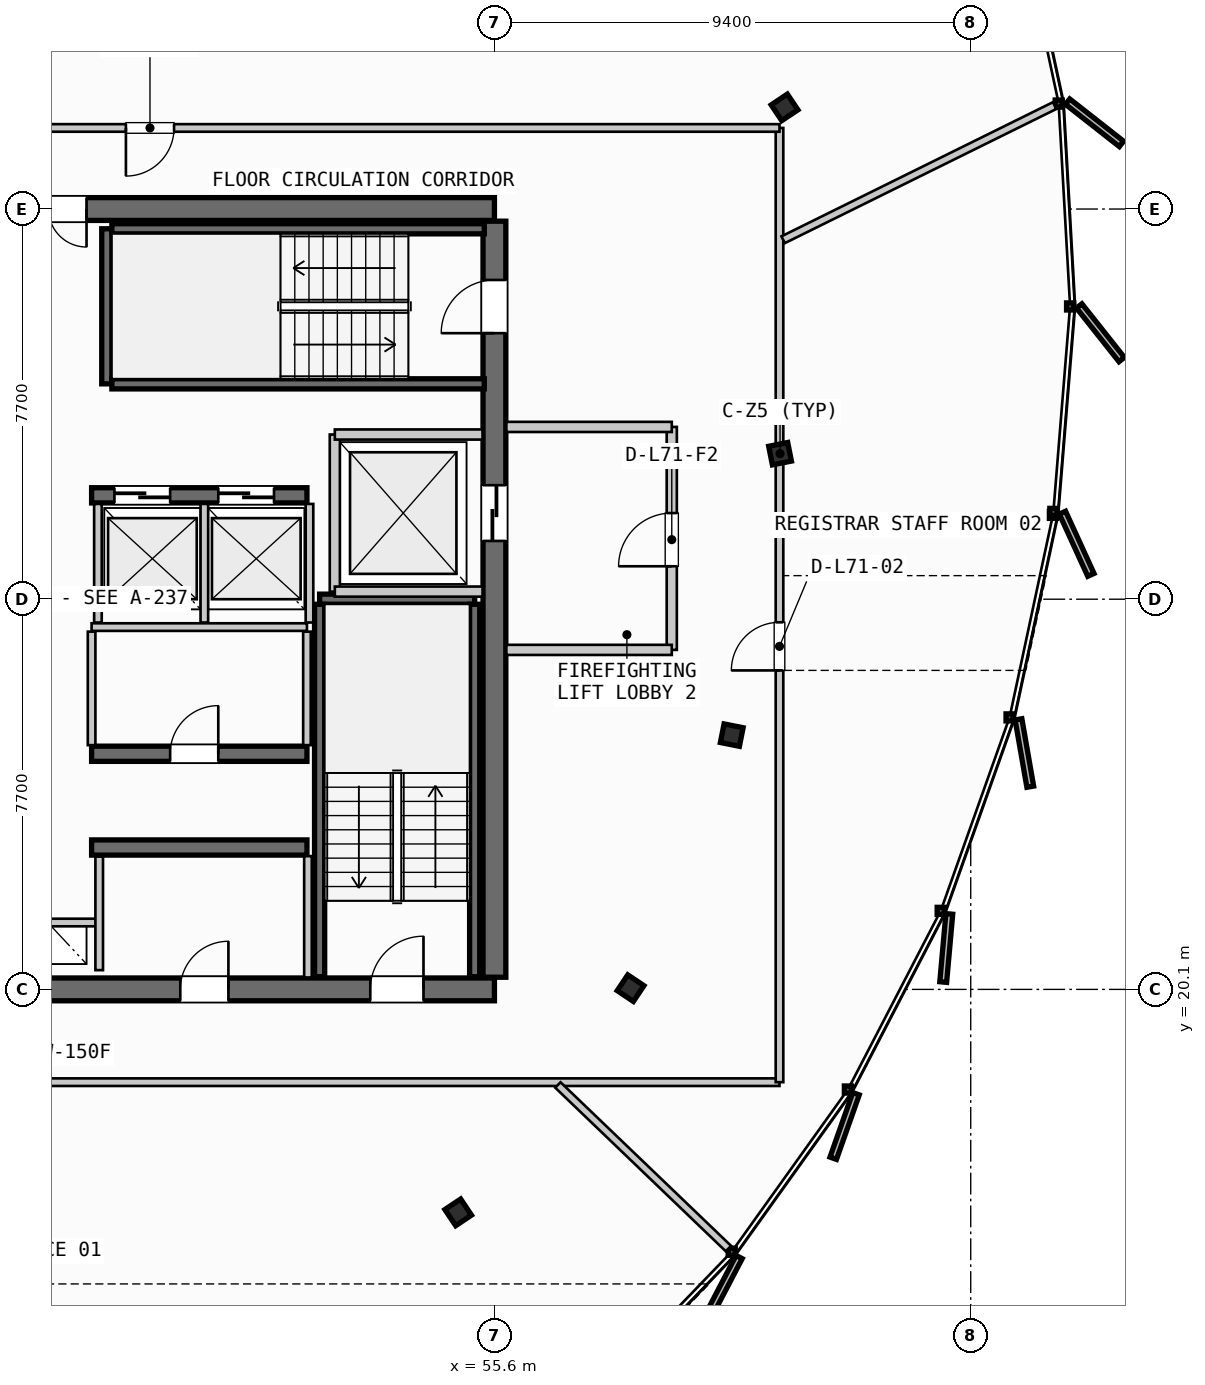
"""IFC4 building model, lengths in metres.
Left out: names, types, materials, properties, quantities, classifications, styles, units other than length and angle.
Written with IfcOpenShell. Run it as: python <this file> out.ifc"""

import sys

from ifc_helpers import new_model, si_unit, direction, frame, frame_2d, origin, origin_2d, place, context, subcontext, project, spatial, rectangle, i_section, extrude, source, transform, mapped, element, fill, save


model = new_model("IFC4")
c1 = context("Model", 3, precision=1e-05, world=origin(), true_north=direction((0.0, 1.0)))
c2 = subcontext(c1, "Body", "Model", "MODEL_VIEW")
j1 = project(units=[si_unit("LENGTHUNIT", "METRE"), si_unit("PLANEANGLEUNIT", "RADIAN")], contexts=[c1])
p1 = place(None, origin())
s1 = spatial("IfcSite", under=j1, at=p1, CompositionType="ELEMENT")
p2 = place(p1, origin())
s2 = spatial("IfcBuilding", under=s1, at=p2, CompositionType="ELEMENT")
p3 = place(p2, frame((0.0, 0.0, 269.8)))
s3 = spatial("IfcBuildingStorey", under=s2, at=p3, CompositionType="ELEMENT", Elevation=269.8)
p4 = place(p3, frame((38.0, 20.1, 0.0), z_axis=(0.0, 0.0, 1.0), x_axis=(1.0, 0.0, 0.0)))
e1 = element("IfcWall", 1, at=p4, inside=s3, PredefinedType="SHEAR", context=c2, shape_type="SweptSolid", body=[
    extrude(rectangle(XDim=17.6, YDim=0.45, at=frame_2d((8.8, 0.0))), origin(), (0.0, 0.0, 1.0), 3.21),
])
p5 = place(p4, frame((1.4, 0.0, 0.0)))
e2 = element("IfcOpeningElement", 2, at=p5, cuts=e1, PredefinedType="OPENING", context=c2, shape_type="SweptSolid", body=[
    extrude(rectangle(XDim=1.05, YDim=2.15, at=frame_2d((0.525, 1.075))), frame((0.0, 0.235, 0.0), z_axis=(0.0, -1.0, 0.0), x_axis=(1.0, 0.0, 0.0)), (0.0, 0.0, 1.0), 0.47),
])
p6 = place(p4, frame((15.15, 0.0, 0.0)))
e3 = element("IfcOpeningElement", 3, at=p6, cuts=e1, PredefinedType="OPENING", context=c2, shape_type="SweptSolid", body=[
    extrude(rectangle(XDim=1.05, YDim=2.15, at=frame_2d((0.525, 1.075))), frame((0.0, 0.235, 0.0), z_axis=(0.0, -1.0, 0.0), x_axis=(1.0, 0.0, 0.0)), (0.0, 0.0, 1.0), 0.47),
])
p7 = place(p4, frame((5.25, 0.0, 0.0)))
e4 = element("IfcOpeningElement", 4, at=p7, cuts=e1, PredefinedType="OPENING", context=c2, shape_type="SweptSolid", body=[
    extrude(rectangle(XDim=0.95, YDim=2.15, at=frame_2d((0.475, 1.075))), frame((0.0, 0.235, 0.0), z_axis=(0.0, -1.0, 0.0), x_axis=(1.0, 0.0, 0.0)), (0.0, 0.0, 1.0), 0.47),
])
p8 = place(p4, frame((11.4, 0.0, 0.0)))
e5 = element("IfcOpeningElement", 5, at=p8, cuts=e1, PredefinedType="OPENING", context=c2, shape_type="SweptSolid", body=[
    extrude(rectangle(XDim=0.95, YDim=2.15, at=frame_2d((0.475, 1.075))), frame((0.0, 0.235, 0.0), z_axis=(0.0, -1.0, 0.0), x_axis=(1.0, 0.0, 0.0)), (0.0, 0.0, 1.0), 0.47),
])
p9 = place(p3, frame((55.6, 35.5, 0.0), z_axis=(0.0, 0.0, 1.0), x_axis=(-1.0, 0.0, 0.0)))
e6 = element("IfcWall", 6, at=p9, inside=s3, PredefinedType="SHEAR", context=c2, shape_type="SweptSolid", body=[
    extrude(rectangle(XDim=17.6, YDim=0.45, at=frame_2d((8.8, 0.0))), origin(), (0.0, 0.0, 1.0), 3.21),
])
p10 = place(p9, frame((8.05, 0.0, 0.0)))
e7 = element("IfcOpeningElement", 7, at=p10, cuts=e6, PredefinedType="OPENING", context=c2, shape_type="SweptSolid", body=[
    extrude(rectangle(XDim=1.5, YDim=2.2, at=frame_2d((0.75, 1.1))), frame((0.0, 0.235, 0.0), z_axis=(0.0, -1.0, 0.0), x_axis=(1.0, 0.0, 0.0)), (0.0, 0.0, 1.0), 0.47),
])
p11 = place(p9, frame((15.1, 0.0, 0.0)))
e8 = element("IfcOpeningElement", 8, at=p11, cuts=e6, PredefinedType="OPENING", context=c2, shape_type="SweptSolid", body=[
    extrude(rectangle(XDim=0.95, YDim=2.15, at=frame_2d((0.475, 1.075))), frame((0.0, 0.235, 0.0), z_axis=(0.0, -1.0, 0.0), x_axis=(1.0, 0.0, 0.0)), (0.0, 0.0, 1.0), 0.47),
])
p12 = place(p9, frame((12.6, 0.0, 0.0)))
e9 = element("IfcOpeningElement", 9, at=p12, cuts=e6, PredefinedType="OPENING", context=c2, shape_type="SweptSolid", body=[
    extrude(rectangle(XDim=0.95, YDim=2.15, at=frame_2d((0.475, 1.075))), frame((0.0, 0.235, 0.0), z_axis=(0.0, -1.0, 0.0), x_axis=(1.0, 0.0, 0.0)), (0.0, 0.0, 1.0), 0.47),
])
p13 = place(p9, frame((10.45, 0.0, 0.0)))
e10 = element("IfcOpeningElement", 10, at=p13, cuts=e6, PredefinedType="OPENING", context=c2, shape_type="SweptSolid", body=[
    extrude(rectangle(XDim=0.95, YDim=2.15, at=frame_2d((0.475, 1.075))), frame((0.0, 0.235, 0.0), z_axis=(0.0, -1.0, 0.0), x_axis=(1.0, 0.0, 0.0)), (0.0, 0.0, 1.0), 0.47),
])
p14 = place(p3, frame((55.6, 20.34, 0.0), z_axis=(0.0, 0.0, 1.0), x_axis=(0.0, 1.0, 0.0)))
e11 = element("IfcWall", 11, at=p14, inside=s3, PredefinedType="SHEAR", context=c2, shape_type="SweptSolid", body=[
    extrude(rectangle(XDim=14.92, YDim=0.45, at=frame_2d((7.46, 0.0))), origin(), (0.0, 0.0, 1.0), 3.21),
])
p15 = place(p14, frame((12.71, 0.0, 0.0)))
e12 = element("IfcOpeningElement", 12, at=p15, cuts=e11, PredefinedType="OPENING", context=c2, shape_type="SweptSolid", body=[
    extrude(rectangle(XDim=1.05, YDim=2.15, at=frame_2d((0.525, 1.075))), frame((0.0, 0.235, 0.0), z_axis=(0.0, -1.0, 0.0), x_axis=(1.0, 0.0, 0.0)), (0.0, 0.0, 1.0), 0.47),
])
p16 = place(p14, frame((8.61, 0.0, 0.0)))
e13 = element("IfcOpeningElement", 13, at=p16, cuts=e11, PredefinedType="OPENING", context=c2, shape_type="SweptSolid", body=[
    extrude(rectangle(XDim=1.1, YDim=2.2, at=frame_2d((0.55, 1.1))), frame((0.0, 0.235, 0.0), z_axis=(0.0, -1.0, 0.0), x_axis=(1.0, 0.0, 0.0)), (0.0, 0.0, 1.0), 0.47),
])
p17 = place(p3, frame((47.65, 22.9, 0.0), z_axis=(0.0, 0.0, 1.0), x_axis=(1.0, 0.0, 0.0)))
e14 = element("IfcWall", 14, at=p17, inside=s3, PredefinedType="SHEAR", context=c2, shape_type="SweptSolid", body=[
    extrude(rectangle(XDim=4.25, YDim=0.3, at=frame_2d((2.125, 0.0))), origin(), (0.0, 0.0, 1.0), 3.21),
])
p18 = place(p3, frame((47.65, 24.75, 0.0), z_axis=(0.0, 0.0, 1.0), x_axis=(1.0, 0.0, 0.0)))
e15 = element("IfcWall", 15, at=p18, inside=s3, PredefinedType="SHEAR", context=c2, shape_type="SweptSolid", body=[
    extrude(rectangle(XDim=4.25, YDim=0.3, at=frame_2d((2.125, 0.0))), origin(), (0.0, 0.0, 1.0), 3.21),
])
p19 = place(p18, frame((1.55, 0.0, 0.0)))
e16 = element("IfcOpeningElement", 16, at=p19, cuts=e15, PredefinedType="OPENING", context=c2, shape_type="SweptSolid", body=[
    extrude(rectangle(XDim=0.95, YDim=2.15, at=frame_2d((0.475, 1.075))), frame((0.0, 0.16, 0.0), z_axis=(0.0, -1.0, 0.0), x_axis=(1.0, 0.0, 0.0)), (0.0, 0.0, 1.0), 0.32),
])
p20 = place(p3, frame((47.65, 29.85, 0.0), z_axis=(0.0, 0.0, 1.0), x_axis=(1.0, 0.0, 0.0)))
e17 = element("IfcWall", 17, at=p20, inside=s3, PredefinedType="SHEAR", context=c2, shape_type="SweptSolid", body=[
    extrude(rectangle(XDim=4.25, YDim=0.3, at=frame_2d((2.125, 0.0))), origin(), (0.0, 0.0, 1.0), 3.21),
])
p21 = place(p20, frame((0.45, 0.0, 0.0)))
e18 = element("IfcOpeningElement", 18, at=p21, cuts=e17, PredefinedType="OPENING", context=c2, shape_type="SweptSolid", body=[
    extrude(rectangle(XDim=1.1, YDim=2.2, at=frame_2d((0.55, 1.1))), frame((0.0, 0.16, 0.0), z_axis=(0.0, -1.0, 0.0), x_axis=(1.0, 0.0, 0.0)), (0.0, 0.0, 1.0), 0.32),
])
p22 = place(p20, frame((2.5, 0.0, 0.0)))
e19 = element("IfcOpeningElement", 19, at=p22, cuts=e17, PredefinedType="OPENING", context=c2, shape_type="SweptSolid", body=[
    extrude(rectangle(XDim=1.1, YDim=2.2, at=frame_2d((0.55, 1.1))), frame((0.0, 0.16, 0.0), z_axis=(0.0, -1.0, 0.0), x_axis=(1.0, 0.0, 0.0)), (0.0, 0.0, 1.0), 0.32),
])
m1 = source(origin(), c2, "Body", "SweptSolid", [
    extrude(i_section(OverallWidth=0.374, OverallDepth=0.383, WebThickness=0.017, FlangeThickness=0.026, FilletRadius=0.015, at=origin_2d()), origin(), (0.0, 0.0, 1.0), 3.21),
])
for number, where, z_axis, x_axis in (
    (20, (61.237, 30.672, 0.0), (0.0, 0.0, 1.0), (0.981, 0.195, 0.0)),
    (21, (61.326, 37.506, 0.0), (0.0, 0.0, 1.0), (0.831, 0.556, 0.0)),
    (22, (54.885, 15.7, 0.0), (0.0, 0.0, 1.0), (0.556, -0.831, 0.0)),
    (23, (58.287, 20.125, 0.0), (0.0, 0.0, 1.0), (0.831, -0.556, 0.0)),
    (24, (60.284, 25.118, 0.0), (0.0, 0.0, 1.0), (0.981, -0.195, 0.0)),
):
    element("IfcColumn", number, at=place(p3, frame(where, z_axis=z_axis, x_axis=x_axis)), inside=s3, PredefinedType="COLUMN", context=c2, shape_type="MappedRepresentation", body=[
        mapped(m1, transform((0.0, 0.0, 0.0), scale=1.0)),
    ])
p23 = place(p3, frame((52.15, 27.8, 0.0), z_axis=(0.0, 0.0, 1.0), x_axis=(1.0, 0.0, 0.0)))
e25 = element("IfcWall", 25, at=p23, inside=s3, PredefinedType="SHEAR", context=c2, shape_type="SweptSolid", body=[
    extrude(rectangle(XDim=3.06, YDim=0.2, at=frame_2d((1.53, 0.0))), origin(), (0.0, 0.0, 1.0), 3.21),
])
for number, where, z_axis, x_axis in (
    (26, (55.21, 27.7, 0.0), (0.0, 0.0, 1.0), (0.0, -1.0, 0.0)),
    (27, (52.15, 20.35, 0.0), (0.0, 0.0, 1.0), (0.0, 1.0, 0.0)),
):
    element("IfcWall", number, at=place(p3, frame(where, z_axis=z_axis, x_axis=x_axis)), inside=s3, PredefinedType="SHEAR", context=c2, shape_type="SweptSolid", body=[
        extrude(rectangle(XDim=7.35, YDim=0.2, at=frame_2d((3.675, 0.0))), origin(), (0.0, 0.0, 1.0), 3.21),
    ])
p24 = place(p3, frame((47.95, 32.05, 0.0), z_axis=(0.0, 0.0, 1.0), x_axis=(0.0, 1.0, 0.0)))
e28 = element("IfcWall", 28, at=p24, inside=s3, PredefinedType="SHEAR", context=c2, shape_type="SweptSolid", body=[
    extrude(rectangle(XDim=3.06, YDim=0.2, at=frame_2d((1.53, 0.0))), origin(), (0.0, 0.0, 1.0), 3.21),
])
for number, where, z_axis, x_axis in (
    (29, (48.05, 35.11, 0.0), (0.0, 0.0, 1.0), (1.0, 0.0, 0.0)),
    (30, (55.4, 32.05, 0.0), (0.0, 0.0, 1.0), (-1.0, 0.0, 0.0)),
):
    element("IfcWall", number, at=place(p3, frame(where, z_axis=z_axis, x_axis=x_axis)), inside=s3, PredefinedType="SHEAR", context=c2, shape_type="SweptSolid", body=[
        extrude(rectangle(XDim=7.35, YDim=0.2, at=frame_2d((3.675, 0.0))), origin(), (0.0, 0.0, 1.0), 3.21),
    ])
p25 = place(p3, frame((45.8, 21.42, 0.0), z_axis=(0.0, 0.0, 1.0), x_axis=(1.0, 0.0, 0.0)))
e31 = element("IfcWall", 31, at=p25, inside=s3, PredefinedType="PARTITIONING", context=c2, shape_type="SweptSolid", body=[
    extrude(rectangle(XDim=2.0, YDim=0.15, at=frame_2d((1.0, 0.0))), origin(), (0.0, 0.0, 1.0), 2.595),
])
p26 = place(p3, frame((47.8, 20.48, 0.0), z_axis=(0.0, 0.0, 1.0), x_axis=(0.0, 1.0, 0.0)))
e32 = element("IfcWall", 32, at=p26, inside=s3, PredefinedType="PARTITIONING", context=c2, shape_type="SweptSolid", body=[
    extrude(rectangle(XDim=2.24, YDim=0.15, at=frame_2d((1.12, 0.0))), origin(), (0.0, 0.0, 1.0), 2.595),
])
p27 = place(p3, frame((52.45, 27.95, 0.0), z_axis=(0.0, 0.0, 1.0), x_axis=(0.0, 1.0, 0.0)))
e33 = element("IfcWall", 33, at=p27, inside=s3, PredefinedType="PARTITIONING", context=c2, shape_type="SweptSolid", body=[
    extrude(rectangle(XDim=3.1, YDim=0.2, at=frame_2d((1.55, 0.0))), origin(), (0.0, 0.0, 1.0), 2.595),
])
for number, where, z_axis, x_axis in (
    (34, (52.45, 27.95, 0.0), (0.0, 0.0, 1.0), (1.0, 0.0, 0.0)),
    (35, (52.45, 31.05, 0.0), (0.0, 0.0, 1.0), (1.0, 0.0, 0.0)),
):
    element("IfcWall", number, at=place(p3, frame(where, z_axis=z_axis, x_axis=x_axis)), inside=s3, PredefinedType="PARTITIONING", context=c2, shape_type="SweptSolid", body=[
        extrude(rectangle(XDim=2.915, YDim=0.2, at=frame_2d((1.458, 0.0))), origin(), (0.0, 0.0, 1.0), 2.595),
    ])
p28 = place(p3, frame((59.1, 26.8, 0.0), z_axis=(0.0, 0.0, 1.0), x_axis=(0.0, 1.0, 0.0)))
e36 = element("IfcWall", 36, at=p28, inside=s3, PredefinedType="PARTITIONING", context=c2, shape_type="SweptSolid", body=[
    extrude(rectangle(XDim=4.4, YDim=0.2, at=frame_2d((2.2, 0.0))), origin(), (0.0, 0.0, 1.0), 2.595),
])
p29 = place(p28, frame((1.65, 0.0, 0.0)))
e37 = element("IfcOpeningElement", 37, at=p29, cuts=e36, PredefinedType="OPENING", context=c2, shape_type="SweptSolid", body=[
    extrude(rectangle(XDim=1.05, YDim=2.15, at=frame_2d((0.525, 1.075))), frame((0.0, 0.11, 0.0), z_axis=(0.0, -1.0, 0.0), x_axis=(1.0, 0.0, 0.0)), (0.0, 0.0, 1.0), 0.22),
])
for number, where, z_axis, x_axis in (
    (38, (55.835, 26.8, 0.0), (0.0, 0.0, 1.0), (1.0, 0.0, 0.0)),
    (39, (55.835, 31.2, 0.0), (0.0, 0.0, 1.0), (1.0, 0.0, 0.0)),
):
    element("IfcWall", number, at=place(p3, frame(where, z_axis=z_axis, x_axis=x_axis)), inside=s3, PredefinedType="PARTITIONING", context=c2, shape_type="SweptSolid", body=[
        extrude(rectangle(XDim=3.265, YDim=0.2, at=frame_2d((1.633, 0.0))), origin(), (0.0, 0.0, 1.0), 2.595),
    ])
p30 = place(p3, frame((51.92, 20.335, 0.0), z_axis=(0.0, 0.0, 1.0), x_axis=(0.0, 1.0, 0.0)))
e40 = element("IfcWall", 40, at=p30, inside=s3, PredefinedType="PARTITIONING", context=c2, shape_type="SweptSolid", body=[
    extrude(rectangle(XDim=2.395, YDim=0.15, at=frame_2d((1.198, 0.0))), origin(), (0.0, 0.0, 1.0), 2.595),
])
p31 = place(p3, frame((47.65, 27.25, 0.0), z_axis=(0.0, 0.0, 1.0), x_axis=(1.0, 0.0, 0.0)))
e41 = element("IfcWall", 41, at=p31, inside=s3, PredefinedType="PARTITIONING", context=c2, shape_type="SweptSolid", body=[
    extrude(rectangle(XDim=4.25, YDim=0.15, at=frame_2d((2.125, 0.0))), origin(), (0.0, 0.0, 1.0), 2.595),
])
for number, where, z_axis, x_axis in (
    (42, (47.65, 24.92, 0.0), (0.0, 0.0, 1.0), (0.0, 1.0, 0.0)),
    (43, (51.9, 24.92, 0.0), (0.0, 0.0, 1.0), (0.0, 1.0, 0.0)),
):
    element("IfcWall", number, at=place(p3, frame(where, z_axis=z_axis, x_axis=x_axis)), inside=s3, PredefinedType="PARTITIONING", context=c2, shape_type="SweptSolid", body=[
        extrude(rectangle(XDim=2.24, YDim=0.15, at=frame_2d((1.12, 0.0))), origin(), (0.0, 0.0, 1.0), 2.595),
    ])
for number, where, z_axis, x_axis in (
    (44, (47.775, 27.34, 0.0), (0.0, 0.0, 1.0), (0.0, 1.0, 0.0)),
    (45, (49.875, 27.34, 0.0), (0.0, 0.0, 1.0), (0.0, 1.0, 0.0)),
    (46, (51.95, 27.34, 0.0), (0.0, 0.0, 1.0), (0.0, 1.0, 0.0)),
):
    element("IfcWall", number, at=place(p3, frame(where, z_axis=z_axis, x_axis=x_axis)), inside=s3, PredefinedType="PARTITIONING", context=c2, shape_type="SweptSolid", body=[
        extrude(rectangle(XDim=2.34, YDim=0.15, at=frame_2d((1.17, 0.0))), origin(), (0.0, 0.0, 1.0), 2.595),
    ])
p32 = place(p3, frame((32.07, 18.269, 0.0), z_axis=(0.0, 0.0, 1.0), x_axis=(1.0, 0.0, 0.0)))
e47 = element("IfcWall", 47, at=p32, inside=s3, PredefinedType="PARTITIONING", context=c2, shape_type="SweptSolid", body=[
    extrude(rectangle(XDim=29.156, YDim=0.15, at=frame_2d((14.578, 0.0))), origin(), (0.0, 0.0, 1.0), 2.595),
])
p33 = place(p32, frame((12.24, 0.0, 0.0)))
e48 = element("IfcOpeningElement", 48, at=p33, cuts=e47, PredefinedType="OPENING", context=c2, shape_type="SweptSolid", body=[
    extrude(rectangle(XDim=0.95, YDim=2.15, at=frame_2d((0.475, 1.075))), frame((0.0, 0.085, 0.0), z_axis=(0.0, -1.0, 0.0), x_axis=(1.0, 0.0, 0.0)), (0.0, 0.0, 1.0), 0.17),
])
p34 = place(p3, frame((61.226, 18.269, 0.0), z_axis=(0.0, 0.0, 1.0), x_axis=(0.0, 1.0, 0.0)))
e49 = element("IfcWall", 49, at=p34, inside=s3, PredefinedType="PARTITIONING", context=c2, shape_type="SweptSolid", body=[
    extrude(rectangle(XDim=18.831, YDim=0.15, at=frame_2d((9.416, 0.0))), origin(), (0.0, 0.0, 1.0), 2.595),
])
p35 = place(p34, frame((8.125, 0.0, 0.0)))
e50 = element("IfcOpeningElement", 50, at=p35, cuts=e49, PredefinedType="OPENING", context=c2, shape_type="SweptSolid", body=[
    extrude(rectangle(XDim=0.95, YDim=2.15, at=frame_2d((0.475, 1.075))), frame((0.0, 0.085, 0.0), z_axis=(0.0, -1.0, 0.0), x_axis=(1.0, 0.0, 0.0)), (0.0, 0.0, 1.0), 0.17),
])
p36 = place(p3, frame((61.226, 37.1, 0.0), z_axis=(0.0, 0.0, 1.0), x_axis=(-1.0, 0.0, 0.0)))
e51 = element("IfcWall", 51, at=p36, inside=s3, PredefinedType="PARTITIONING", context=c2, shape_type="SweptSolid", body=[
    extrude(rectangle(XDim=29.156, YDim=0.15, at=frame_2d((14.578, 0.0))), origin(), (0.0, 0.0, 1.0), 2.595),
])
p37 = place(p36, frame((11.949, 0.0, 0.0)))
e52 = element("IfcOpeningElement", 52, at=p37, cuts=e51, PredefinedType="OPENING", context=c2, shape_type="SweptSolid", body=[
    extrude(rectangle(XDim=0.95, YDim=2.15, at=frame_2d((0.475, 1.075))), frame((0.0, 0.085, 0.0), z_axis=(0.0, -1.0, 0.0), x_axis=(1.0, 0.0, 0.0)), (0.0, 0.0, 1.0), 0.17),
])
p38 = place(p3, frame((56.853, 18.214, 0.0), z_axis=(0.0, 0.0, 1.0), x_axis=(0.721715732621, -0.69218957034, 0.0)))
e53 = element("IfcWall", 53, at=p38, inside=s3, PredefinedType="PARTITIONING", context=c2, shape_type="SweptSolid", body=[
    extrude(rectangle(XDim=4.664, YDim=0.15, at=frame_2d((2.332, 0.0))), origin(), (0.0, 0.0, 1.0), 2.595),
])
p39 = place(p3, frame((61.298, 34.894, 0.0), z_axis=(0.0, 0.0, 1.0), x_axis=(0.896516981109, 0.443009370763, 0.0)))
e54 = element("IfcWall", 54, at=p39, inside=s3, PredefinedType="PARTITIONING", context=c2, shape_type="SweptSolid", body=[
    extrude(rectangle(XDim=5.977, YDim=0.15, at=frame_2d((2.988, 0.0))), origin(), (0.0, 0.0, 1.0), 2.595),
])
m2 = source(origin(), c2, "Body", "SweptSolid", [
    extrude(rectangle(XDim=1.05, YDim=2.15, at=frame_2d((0.525, 1.075))), frame((0.0, 0.025, 0.0), z_axis=(0.0, -1.0, 0.0), x_axis=(1.0, 0.0, 0.0)), (0.0, 0.0, 1.0), 0.05),
])
p40 = place(p6, origin())
e55 = element("IfcDoor", 55, at=p40, inside=s3, OperationType="SINGLE_SWING_RIGHT", PredefinedType="DOOR", context=c2, shape_type="MappedRepresentation", body=[
    mapped(m2, transform((0.0, 0.0, 0.0), scale=1.0)),
])
fill(e3, e55)
p41 = place(p15, origin())
e56 = element("IfcDoor", 56, at=p41, inside=s3, OperationType="SINGLE_SWING_LEFT", PredefinedType="DOOR", context=c2, shape_type="MappedRepresentation", body=[
    mapped(m2, transform((0.0, 0.0, 0.0), scale=1.0)),
])
fill(e12, e56)
m3 = source(origin(), c2, "Body", "SweptSolid", [
    extrude(rectangle(XDim=1.5, YDim=2.2, at=frame_2d((0.75, 1.1))), frame((0.0, 0.025, 0.0), z_axis=(0.0, -1.0, 0.0), x_axis=(1.0, 0.0, 0.0)), (0.0, 0.0, 1.0), 0.05),
])
p42 = place(p10, origin())
e57 = element("IfcDoor", 57, at=p42, inside=s3, OperationType="DOUBLE_DOOR_SINGLE_SWING", PredefinedType="DOOR", context=c2, shape_type="MappedRepresentation", body=[
    mapped(m3, transform((0.0, 0.0, 0.0), scale=1.0)),
])
fill(e7, e57)
m4 = source(origin(), c2, "Body", "SweptSolid", [
    extrude(rectangle(XDim=1.1, YDim=2.2, at=frame_2d((0.55, 1.1))), frame((0.0, 0.025, 0.0), z_axis=(0.0, -1.0, 0.0), x_axis=(1.0, 0.0, 0.0)), (0.0, 0.0, 1.0), 0.05),
])
p43 = place(p16, origin())
e58 = element("IfcDoor", 58, at=p43, inside=s3, OperationType="SLIDING_TO_RIGHT", PredefinedType="DOOR", context=c2, shape_type="MappedRepresentation", body=[
    mapped(m4, transform((0.0, 0.0, 0.0), scale=1.0)),
])
fill(e13, e58)
m5 = source(origin(), c2, "Body", "SweptSolid", [
    extrude(rectangle(XDim=0.95, YDim=2.15, at=frame_2d((0.475, 1.075))), frame((0.0, 0.025, 0.0), z_axis=(0.0, -1.0, 0.0), x_axis=(1.0, 0.0, 0.0)), (0.0, 0.0, 1.0), 0.05),
])
p44 = place(p8, origin())
e59 = element("IfcDoor", 59, at=p44, inside=s3, OperationType="SINGLE_SWING_RIGHT", PredefinedType="DOOR", context=c2, shape_type="MappedRepresentation", body=[
    mapped(m5, transform((0.0, 0.0, 0.0), scale=1.0)),
])
fill(e5, e59)
p45 = place(p19, origin())
e60 = element("IfcDoor", 60, at=p45, inside=s3, OperationType="SINGLE_SWING_RIGHT", PredefinedType="DOOR", context=c2, shape_type="MappedRepresentation", body=[
    mapped(m5, transform((0.0, 0.0, 0.0), scale=1.0)),
])
fill(e16, e60)
p46 = place(p21, origin())
e61 = element("IfcDoor", 61, at=p46, inside=s3, OperationType="SLIDING_TO_LEFT", PredefinedType="DOOR", context=c2, shape_type="MappedRepresentation", body=[
    mapped(m4, transform((0.0, 0.0, 0.0), scale=1.0)),
])
fill(e18, e61)
p47 = place(p22, origin())
e62 = element("IfcDoor", 62, at=p47, inside=s3, OperationType="SLIDING_TO_LEFT", PredefinedType="DOOR", context=c2, shape_type="MappedRepresentation", body=[
    mapped(m4, transform((0.0, 0.0, 0.0), scale=1.0)),
])
fill(e19, e62)
p48 = place(p29, origin())
e63 = element("IfcDoor", 63, at=p48, inside=s3, OperationType="SINGLE_SWING_LEFT", PredefinedType="DOOR", context=c2, shape_type="MappedRepresentation", body=[
    mapped(m2, transform((0.0, 0.0, 0.0), scale=1.0)),
])
fill(e37, e63)
p49 = place(p35, origin())
e64 = element("IfcDoor", 64, at=p49, inside=s3, OperationType="SINGLE_SWING_LEFT", PredefinedType="DOOR", context=c2, shape_type="MappedRepresentation", body=[
    mapped(m5, transform((0.0, 0.0, 0.0), scale=1.0)),
])
fill(e50, e64)
p50 = place(p37, origin())
e65 = element("IfcDoor", 65, at=p50, inside=s3, OperationType="SINGLE_SWING_RIGHT", PredefinedType="DOOR", context=c2, shape_type="MappedRepresentation", body=[
    mapped(m5, transform((0.0, 0.0, 0.0), scale=1.0)),
])
fill(e52, e65)
save(model, sys.argv[1])
